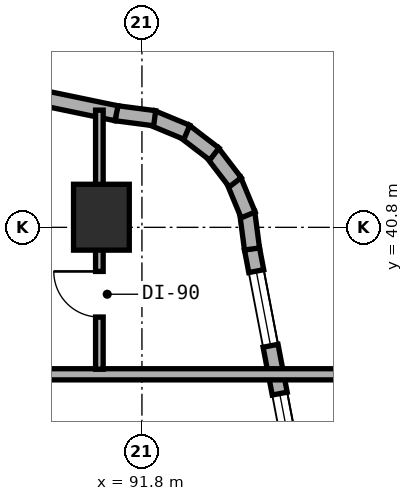
"""IFC4 building model, lengths in metres.
Left out: names, types, materials, properties, quantities, classifications, styles, units other than length and angle.
Written with IfcOpenShell. Run it as: python <this file> out.ifc"""

import sys

from ifc_helpers import new_model, si_unit, direction, frame, frame_2d, origin, origin_2d, place, context, subcontext, project, spatial, rectangle, extrude, element, fill, save


model = new_model("IFC4")
c1 = context("Model", 3, precision=1e-05, world=origin(), true_north=direction((0.0, 1.0)))
c2 = subcontext(c1, "Body", "Model", "MODEL_VIEW")
j1 = project(units=[si_unit("LENGTHUNIT", "METRE"), si_unit("PLANEANGLEUNIT", "RADIAN")], contexts=[c1])
p1 = place(None, origin())
s1 = spatial("IfcSite", under=j1, at=p1, CompositionType="ELEMENT")
p2 = place(p1, origin())
s2 = spatial("IfcBuilding", under=s1, at=p2, CompositionType="ELEMENT")
p3 = place(p2, frame((0.0, 0.0, 31.0)))
s3 = spatial("IfcBuildingStorey", under=s2, at=p3, CompositionType="ELEMENT", Elevation=31.0)
p4 = place(p3, frame((91.0, 41.0, 0.0), z_axis=(0.0, 0.0, 1.0), x_axis=(1.0, 0.0, 0.0)))
e1 = element("IfcColumn", 1, at=p4, inside=s3, PredefinedType="COLUMN", context=c2, shape_type="SweptSolid", body=[
    extrude(rectangle(XDim=1.1, YDim=1.3, at=origin_2d()), origin(), (0.0, 0.0, 1.0), 3.5),
])
p5 = place(p3, frame((95.783, 30.918, 0.0), z_axis=(0.0, 0.0, 1.0), x_axis=(-0.188087874316, 0.982152203854, 0.0)))
e2 = element("IfcWall", 2, at=p5, inside=s3, PredefinedType="STANDARD", context=c2, shape_type="SweptSolid", body=[
    extrude(rectangle(XDim=9.634, YDim=0.3, at=frame_2d((4.817, 0.0))), origin(), (0.0, 0.0, 1.0), 3.25),
])
p6 = place(p5, frame((1.999, 0.0, 0.8)))
e3 = element("IfcOpeningElement", 3, at=p6, cuts=e2, PredefinedType="OPENING", context=c2, shape_type="SweptSolid", body=[
    extrude(rectangle(XDim=2.4, YDim=1.6, at=frame_2d((1.2, 0.8))), frame((0.0, 0.16, 0.0), z_axis=(0.0, -1.0, 0.0), x_axis=(1.0, 0.0, 0.0)), (0.0, 0.0, 1.0), 0.32),
])
p7 = place(p5, frame((5.521, 0.0, 0.85)))
e4 = element("IfcOpeningElement", 4, at=p7, cuts=e2, PredefinedType="OPENING", context=c2, shape_type="SweptSolid", body=[
    extrude(rectangle(XDim=1.2, YDim=1.5, at=frame_2d((0.6, 0.75))), frame((0.0, 0.16, 0.0), z_axis=(0.0, -1.0, 0.0), x_axis=(1.0, 0.0, 0.0)), (0.0, 0.0, 1.0), 0.32),
])
p8 = place(p5, frame((7.682, 0.0, 0.85)))
e5 = element("IfcOpeningElement", 5, at=p8, cuts=e2, PredefinedType="OPENING", context=c2, shape_type="SweptSolid", body=[
    extrude(rectangle(XDim=1.5, YDim=1.5, at=frame_2d((0.75, 0.75))), frame((0.0, 0.16, 0.0), z_axis=(0.0, -1.0, 0.0), x_axis=(1.0, 0.0, 0.0)), (0.0, 0.0, 1.0), 0.32),
])
p9 = place(p3, frame((93.972, 40.373, 0.0), z_axis=(0.0, 0.0, 1.0), x_axis=(-0.130255288807, 0.991480488834, 0.0)))
e6 = element("IfcWall", 6, at=p9, inside=s3, PredefinedType="STANDARD", context=c2, shape_type="SweptSolid", body=[
    extrude(rectangle(XDim=0.729, YDim=0.3, at=frame_2d((0.365, 0.0))), origin(), (0.0, 0.0, 1.0), 3.25),
])
p10 = place(p3, frame((93.896, 41.045, 0.0), z_axis=(0.0, 0.0, 1.0), x_axis=(-0.383267045233, 0.923637576129, 0.0)))
e7 = element("IfcWall", 7, at=p10, inside=s3, PredefinedType="STANDARD", context=c2, shape_type="SweptSolid", body=[
    extrude(rectangle(XDim=0.746, YDim=0.3, at=frame_2d((0.373, 0.0))), origin(), (0.0, 0.0, 1.0), 3.25),
])
for number, where, z_axis, x_axis in (
    (8, (93.641, 41.689, 0.0), (0.0, 0.0, 1.0), (-0.609, 0.793, 0.0)),
    (9, (93.229, 42.246, 0.0), (0.0, 0.0, 1.0), (-0.794, 0.608, 0.0)),
):
    element("IfcWall", number, at=place(p3, frame(where, z_axis=z_axis, x_axis=x_axis)), inside=s3, PredefinedType="STANDARD", context=c2, shape_type="SweptSolid", body=[
        extrude(rectangle(XDim=0.746, YDim=0.3, at=frame_2d((0.373, 0.0))), origin(), (0.0, 0.0, 1.0), 3.25),
    ])
p11 = place(p3, frame((92.686, 42.676, 0.0), z_axis=(0.0, 0.0, 1.0), x_axis=(-0.923637576129, 0.383267045233, 0.0)))
e10 = element("IfcWall", 10, at=p11, inside=s3, PredefinedType="STANDARD", context=c2, shape_type="SweptSolid", body=[
    extrude(rectangle(XDim=0.746, YDim=0.3, at=frame_2d((0.373, 0.0))), origin(), (0.0, 0.0, 1.0), 3.25),
])
p12 = place(p3, frame((92.051, 42.953, 0.0), z_axis=(0.0, 0.0, 1.0), x_axis=(-0.991559404866, 0.129653178221, 0.0)))
e11 = element("IfcWall", 11, at=p12, inside=s3, PredefinedType="STANDARD", context=c2, shape_type="SweptSolid", body=[
    extrude(rectangle(XDim=0.764, YDim=0.3, at=frame_2d((0.382, 0.0))), origin(), (0.0, 0.0, 1.0), 3.25),
])
p13 = place(p3, frame((91.298, 43.051, 0.0), z_axis=(0.0, 0.0, 1.0), x_axis=(-0.979128391325, 0.203242695569, 0.0)))
e12 = element("IfcWall", 12, at=p13, inside=s3, PredefinedType="STANDARD", context=c2, shape_type="SweptSolid", body=[
    extrude(rectangle(XDim=8.92, YDim=0.3, at=frame_2d((4.46, 0.0))), origin(), (0.0, 0.0, 1.0), 3.25),
])
p14 = place(p13, frame((3.472, 0.0, 0.8)))
e13 = element("IfcOpeningElement", 13, at=p14, cuts=e12, PredefinedType="OPENING", context=c2, shape_type="SweptSolid", body=[
    extrude(rectangle(XDim=2.4, YDim=1.6, at=frame_2d((1.2, 0.8))), frame((0.0, 0.16, 0.0), z_axis=(0.0, -1.0, 0.0), x_axis=(1.0, 0.0, 0.0)), (0.0, 0.0, 1.0), 0.32),
])
p15 = place(p3, frame((88.35, 37.9, 0.0), z_axis=(0.0, 0.0, 1.0), x_axis=(1.0, 0.0, 0.0)))
e14 = element("IfcWall", 14, at=p15, inside=s3, PredefinedType="SOLIDWALL", context=c2, shape_type="SweptSolid", body=[
    extrude(rectangle(XDim=7.41, YDim=0.22, at=frame_2d((3.705, 0.0))), origin(), (0.0, 0.0, 1.0), 2.865),
])
p16 = place(p3, frame((90.96, 38.0, 0.0), z_axis=(0.0, 0.0, 1.0), x_axis=(0.0, 1.0, 0.0)))
e15 = element("IfcWall", 15, at=p16, inside=s3, PredefinedType="PARTITIONING", context=c2, shape_type="SweptSolid", body=[
    extrude(rectangle(XDim=5.113, YDim=0.15, at=frame_2d((2.557, 0.0))), origin(), (0.0, 0.0, 1.0), 2.865),
])
p17 = place(p16, frame((1.03, 0.0, 0.0)))
e16 = element("IfcOpeningElement", 16, at=p17, cuts=e15, PredefinedType="OPENING", context=c2, shape_type="SweptSolid", body=[
    extrude(rectangle(XDim=0.9, YDim=2.1, at=frame_2d((0.45, 1.05))), frame((0.0, 0.085, 0.0), z_axis=(0.0, -1.0, 0.0), x_axis=(1.0, 0.0, 0.0)), (0.0, 0.0, 1.0), 0.17),
])
p18 = place(p7, origin())
e17 = element("IfcWindow", 17, at=p18, inside=s3, PartitioningType="SINGLE_PANEL", PredefinedType="WINDOW", context=c2, shape_type="SweptSolid", body=[
    extrude(rectangle(XDim=1.2, YDim=1.5, at=frame_2d((0.6, 0.75))), frame((0.0, 0.03, 0.0), z_axis=(0.0, -1.0, 0.0), x_axis=(1.0, 0.0, 0.0)), (0.0, 0.0, 1.0), 0.06),
])
fill(e4, e17)
p19 = place(p8, origin())
e18 = element("IfcWindow", 18, at=p19, inside=s3, PartitioningType="SINGLE_PANEL", PredefinedType="WINDOW", context=c2, shape_type="SweptSolid", body=[
    extrude(rectangle(XDim=1.5, YDim=1.5, at=frame_2d((0.75, 0.75))), frame((0.0, 0.03, 0.0), z_axis=(0.0, -1.0, 0.0), x_axis=(1.0, 0.0, 0.0)), (0.0, 0.0, 1.0), 0.06),
])
fill(e5, e18)
p20 = place(p17, origin())
e19 = element("IfcDoor", 19, at=p20, inside=s3, OperationType="SINGLE_SWING_RIGHT", PredefinedType="DOOR", context=c2, shape_type="SweptSolid", body=[
    extrude(rectangle(XDim=0.9, YDim=2.1, at=frame_2d((0.45, 1.05))), frame((0.0, 0.025, 0.0), z_axis=(0.0, -1.0, 0.0), x_axis=(1.0, 0.0, 0.0)), (0.0, 0.0, 1.0), 0.05),
])
fill(e16, e19)
save(model, sys.argv[1])
